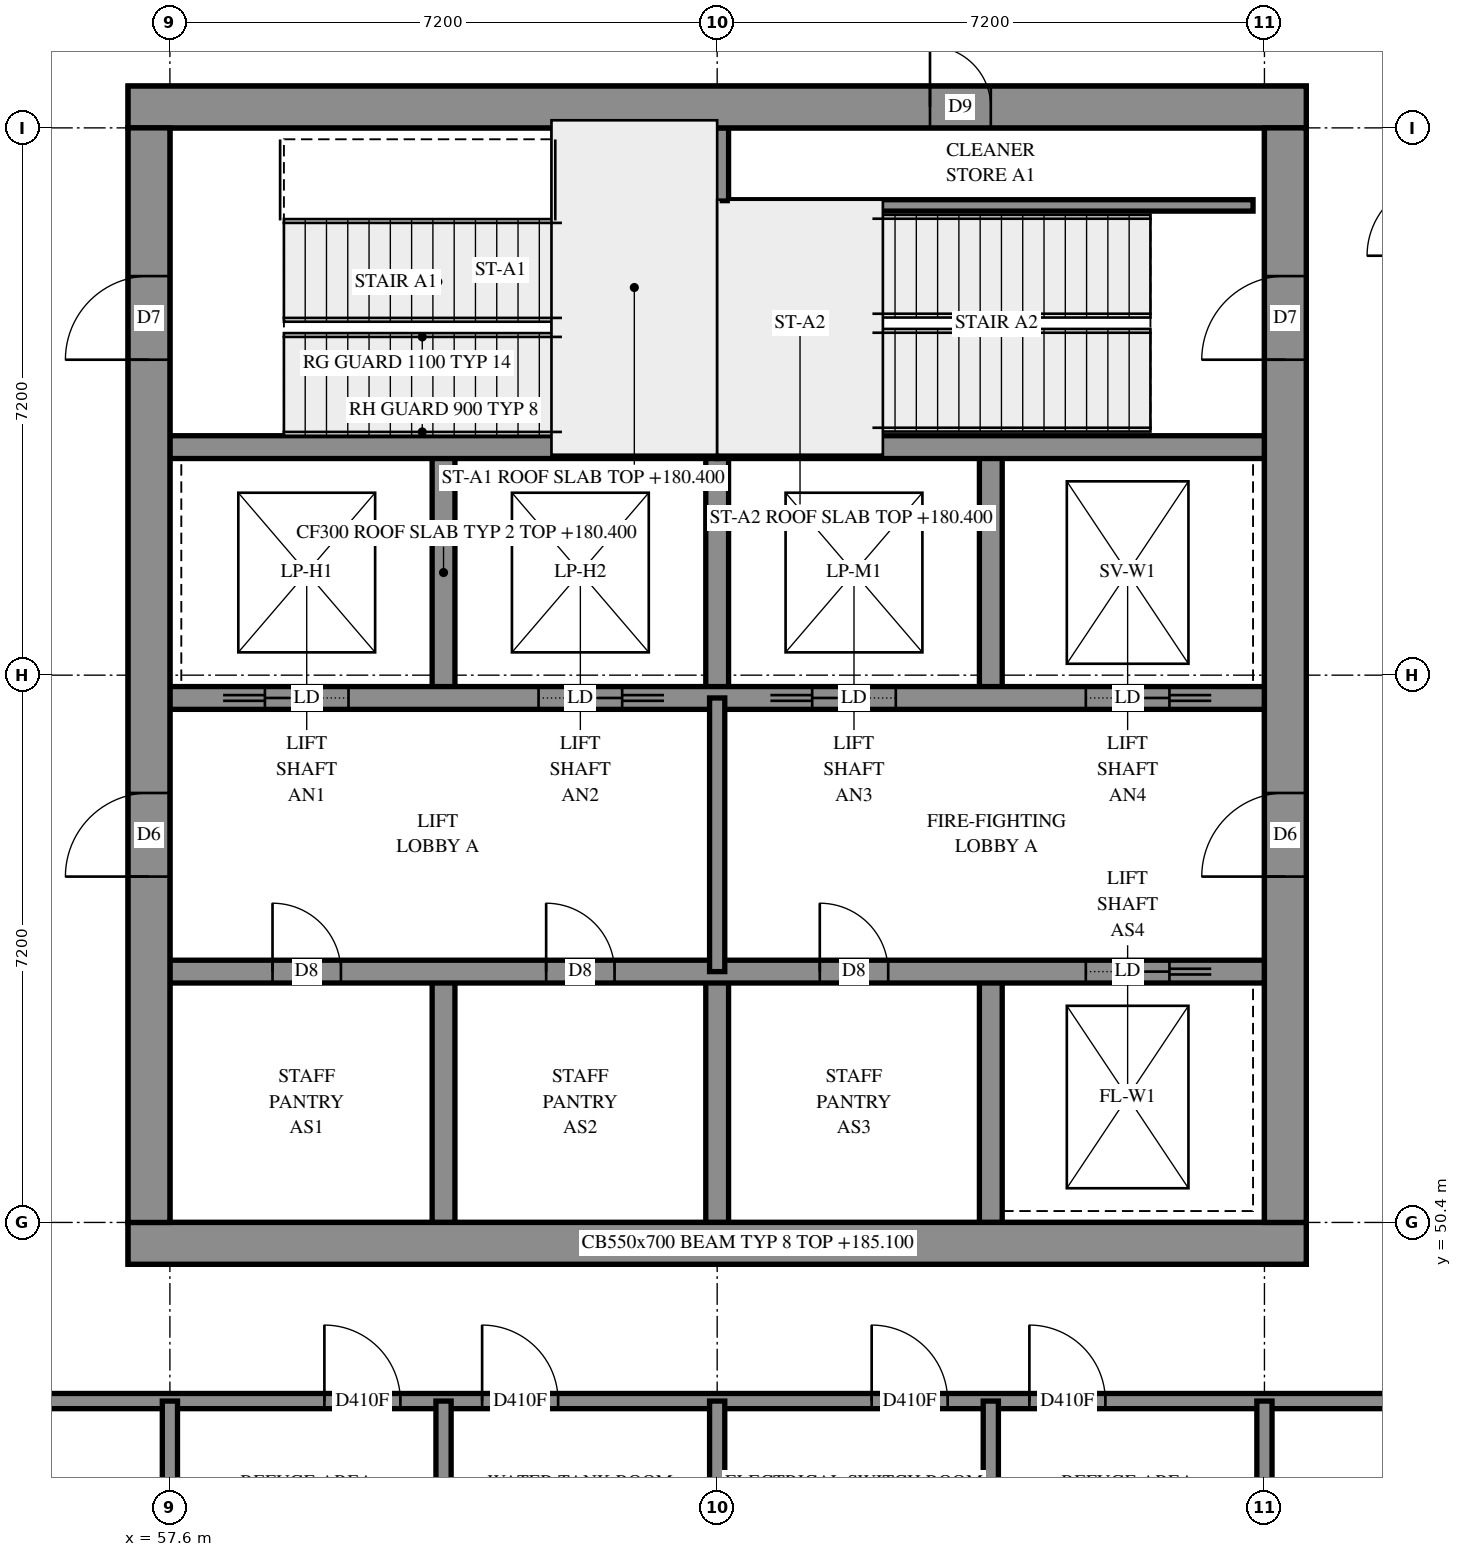
"""IFC4 building model, lengths in metres.
Left out: names, types, materials, properties, quantities, classifications, styles, units other than length and angle.
Written with IfcOpenShell. Run it as: python <this file> out.ifc"""

import sys

from ifc_helpers import new_model, si_unit, direction, frame, frame_2d, origin, place, context, subcontext, project, spatial, rectangle, extrude, element, fill, save


model = new_model("IFC4")
c1 = context("Model", 3, precision=1e-05, world=origin(), true_north=direction((0.0, 1.0)))
c2 = subcontext(c1, "Body", "Model", "MODEL_VIEW")
j1 = project(units=[si_unit("LENGTHUNIT", "METRE"), si_unit("PLANEANGLEUNIT", "RADIAN")], contexts=[c1])
p1 = place(None, origin())
s1 = spatial("IfcSite", under=j1, at=p1, CompositionType="ELEMENT")
p2 = place(p1, origin())
s2 = spatial("IfcBuilding", under=s1, at=p2, CompositionType="ELEMENT")
p3 = place(p2, frame((0.0, 0.0, 180.4)))
s3 = spatial("IfcBuildingStorey", under=s2, at=p3, CompositionType="ELEMENT", Elevation=180.4)
p4 = place(p3, frame((57.05, 50.125, -0.3), z_axis=(0.0, 0.0, 1.0), x_axis=(1.0, 0.0, 0.0)))
e1 = element("IfcWall", 1, at=p4, inside=s3, PredefinedType="SHEAR", context=c2, shape_type="SweptSolid", body=[
    extrude(rectangle(XDim=15.5, YDim=0.55, at=frame_2d((7.75, 0.0))), origin(), (0.0, 0.0, 1.0), 4.3),
])
p5 = place(p3, frame((57.05, 65.075, -0.3), z_axis=(0.0, 0.0, 1.0), x_axis=(1.0, 0.0, 0.0)))
e2 = element("IfcWall", 2, at=p5, inside=s3, PredefinedType="SHEAR", context=c2, shape_type="SweptSolid", body=[
    extrude(rectangle(XDim=15.5, YDim=0.55, at=frame_2d((7.75, 0.0))), origin(), (0.0, 0.0, 1.0), 4.3),
])
p6 = place(p5, frame((10.55, 0.0, 0.3)))
e3 = element("IfcOpeningElement", 3, at=p6, cuts=e2, PredefinedType="OPENING", context=c2, shape_type="SweptSolid", body=[
    extrude(rectangle(XDim=0.8, YDim=2.1, at=frame_2d((0.4, 1.05))), frame((0.0, 0.285, 0.0), z_axis=(0.0, -1.0, 0.0), x_axis=(1.0, 0.0, 0.0)), (0.0, 0.0, 1.0), 0.57),
])
p7 = place(p3, frame((57.325, 50.4, -0.3), z_axis=(0.0, 0.0, 1.0), x_axis=(0.0, 1.0, 0.0)))
e4 = element("IfcWall", 4, at=p7, inside=s3, PredefinedType="SHEAR", context=c2, shape_type="SweptSolid", body=[
    extrude(rectangle(XDim=14.4, YDim=0.55, at=frame_2d((7.2, 0.0))), origin(), (0.0, 0.0, 1.0), 4.3),
])
p8 = place(p7, frame((4.55, 0.0, 0.3)))
e5 = element("IfcOpeningElement", 5, at=p8, cuts=e4, PredefinedType="OPENING", context=c2, shape_type="SweptSolid", body=[
    extrude(rectangle(XDim=1.1, YDim=2.1, at=frame_2d((0.55, 1.05))), frame((0.0, 0.285, 0.0), z_axis=(0.0, -1.0, 0.0), x_axis=(1.0, 0.0, 0.0)), (0.0, 0.0, 1.0), 0.57),
])
p9 = place(p7, frame((11.35, 0.0, 0.3)))
e6 = element("IfcOpeningElement", 6, at=p9, cuts=e4, PredefinedType="OPENING", context=c2, shape_type="SweptSolid", body=[
    extrude(rectangle(XDim=1.1, YDim=2.1, at=frame_2d((0.55, 1.05))), frame((0.0, 0.285, 0.0), z_axis=(0.0, -1.0, 0.0), x_axis=(1.0, 0.0, 0.0)), (0.0, 0.0, 1.0), 0.57),
])
p10 = place(p3, frame((72.275, 50.4, -0.3), z_axis=(0.0, 0.0, 1.0), x_axis=(0.0, 1.0, 0.0)))
e7 = element("IfcWall", 7, at=p10, inside=s3, PredefinedType="SHEAR", context=c2, shape_type="SweptSolid", body=[
    extrude(rectangle(XDim=14.4, YDim=0.55, at=frame_2d((7.2, 0.0))), origin(), (0.0, 0.0, 1.0), 4.3),
])
p11 = place(p10, frame((4.55, 0.0, 0.3)))
e8 = element("IfcOpeningElement", 8, at=p11, cuts=e7, PredefinedType="OPENING", context=c2, shape_type="SweptSolid", body=[
    extrude(rectangle(XDim=1.1, YDim=2.1, at=frame_2d((0.55, 1.05))), frame((0.0, 0.285, 0.0), z_axis=(0.0, -1.0, 0.0), x_axis=(1.0, 0.0, 0.0)), (0.0, 0.0, 1.0), 0.57),
])
p12 = place(p10, frame((11.35, 0.0, 0.3)))
e9 = element("IfcOpeningElement", 9, at=p12, cuts=e7, PredefinedType="OPENING", context=c2, shape_type="SweptSolid", body=[
    extrude(rectangle(XDim=1.1, YDim=2.1, at=frame_2d((0.55, 1.05))), frame((0.0, 0.285, 0.0), z_axis=(0.0, -1.0, 0.0), x_axis=(1.0, 0.0, 0.0)), (0.0, 0.0, 1.0), 0.57),
])
for number, where, z_axis, x_axis in (
    (10, (61.2, 50.4, 0.0), (0.0, 0.0, 1.0), (0.0, 1.0, 0.0)),
    (11, (61.2, 57.3, 0.0), (0.0, 0.0, 1.0), (0.0, 1.0, 0.0)),
    (12, (64.8, 50.4, 0.0), (0.0, 0.0, 1.0), (0.0, 1.0, 0.0)),
    (13, (64.8, 57.3, 0.0), (0.0, 0.0, 1.0), (0.0, 1.0, 0.0)),
    (14, (68.4, 50.4, 0.0), (0.0, 0.0, 1.0), (0.0, 1.0, 0.0)),
    (15, (68.4, 57.3, 0.0), (0.0, 0.0, 1.0), (0.0, 1.0, 0.0)),
):
    element("IfcWall", number, at=place(p3, frame(where, z_axis=z_axis, x_axis=x_axis)), inside=s3, PredefinedType="SOLIDWALL", context=c2, shape_type="SweptSolid", body=[
        extrude(rectangle(XDim=3.3, YDim=0.3, at=frame_2d((1.65, 0.0))), origin(), (0.0, 0.0, 1.0), 4.7),
    ])
p13 = place(p3, frame((57.6, 53.7, 0.0), z_axis=(0.0, 0.0, 1.0), x_axis=(1.0, 0.0, 0.0)))
e16 = element("IfcWall", 16, at=p13, inside=s3, PredefinedType="SOLIDWALL", context=c2, shape_type="SweptSolid", body=[
    extrude(rectangle(XDim=14.4, YDim=0.3, at=frame_2d((7.2, 0.0))), origin(), (0.0, 0.0, 1.0), 4.7),
])
p14 = place(p13, frame((1.35, 0.0, 0.0)))
e17 = element("IfcOpeningElement", 17, at=p14, cuts=e16, PredefinedType="OPENING", context=c2, shape_type="SweptSolid", body=[
    extrude(rectangle(XDim=0.9, YDim=2.1, at=frame_2d((0.45, 1.05))), frame((0.0, 0.16, 0.0), z_axis=(0.0, -1.0, 0.0), x_axis=(1.0, 0.0, 0.0)), (0.0, 0.0, 1.0), 0.32),
])
p15 = place(p13, frame((4.95, 0.0, 0.0)))
e18 = element("IfcOpeningElement", 18, at=p15, cuts=e16, PredefinedType="OPENING", context=c2, shape_type="SweptSolid", body=[
    extrude(rectangle(XDim=0.9, YDim=2.1, at=frame_2d((0.45, 1.05))), frame((0.0, 0.16, 0.0), z_axis=(0.0, -1.0, 0.0), x_axis=(1.0, 0.0, 0.0)), (0.0, 0.0, 1.0), 0.32),
])
p16 = place(p13, frame((8.55, 0.0, 0.0)))
e19 = element("IfcOpeningElement", 19, at=p16, cuts=e16, PredefinedType="OPENING", context=c2, shape_type="SweptSolid", body=[
    extrude(rectangle(XDim=0.9, YDim=2.1, at=frame_2d((0.45, 1.05))), frame((0.0, 0.16, 0.0), z_axis=(0.0, -1.0, 0.0), x_axis=(1.0, 0.0, 0.0)), (0.0, 0.0, 1.0), 0.32),
])
p17 = place(p13, frame((12.05, 0.0, 0.0)))
e20 = element("IfcOpeningElement", 20, at=p17, cuts=e16, PredefinedType="OPENING", context=c2, shape_type="SweptSolid", body=[
    extrude(rectangle(XDim=1.1, YDim=2.1, at=frame_2d((0.55, 1.05))), frame((0.0, 0.16, 0.0), z_axis=(0.0, -1.0, 0.0), x_axis=(1.0, 0.0, 0.0)), (0.0, 0.0, 1.0), 0.32),
])
p18 = place(p3, frame((57.6, 57.3, 0.0), z_axis=(0.0, 0.0, 1.0), x_axis=(1.0, 0.0, 0.0)))
e21 = element("IfcWall", 21, at=p18, inside=s3, PredefinedType="SOLIDWALL", context=c2, shape_type="SweptSolid", body=[
    extrude(rectangle(XDim=14.4, YDim=0.3, at=frame_2d((7.2, 0.0))), origin(), (0.0, 0.0, 1.0), 4.7),
])
p19 = place(p18, frame((1.25, 0.0, 0.0)))
e22 = element("IfcOpeningElement", 22, at=p19, cuts=e21, PredefinedType="OPENING", context=c2, shape_type="SweptSolid", body=[
    extrude(rectangle(XDim=1.1, YDim=2.1, at=frame_2d((0.55, 1.05))), frame((0.0, 0.16, 0.0), z_axis=(0.0, -1.0, 0.0), x_axis=(1.0, 0.0, 0.0)), (0.0, 0.0, 1.0), 0.32),
])
p20 = place(p18, frame((4.85, 0.0, 0.0)))
e23 = element("IfcOpeningElement", 23, at=p20, cuts=e21, PredefinedType="OPENING", context=c2, shape_type="SweptSolid", body=[
    extrude(rectangle(XDim=1.1, YDim=2.1, at=frame_2d((0.55, 1.05))), frame((0.0, 0.16, 0.0), z_axis=(0.0, -1.0, 0.0), x_axis=(1.0, 0.0, 0.0)), (0.0, 0.0, 1.0), 0.32),
])
p21 = place(p18, frame((8.45, 0.0, 0.0)))
e24 = element("IfcOpeningElement", 24, at=p21, cuts=e21, PredefinedType="OPENING", context=c2, shape_type="SweptSolid", body=[
    extrude(rectangle(XDim=1.1, YDim=2.1, at=frame_2d((0.55, 1.05))), frame((0.0, 0.16, 0.0), z_axis=(0.0, -1.0, 0.0), x_axis=(1.0, 0.0, 0.0)), (0.0, 0.0, 1.0), 0.32),
])
p22 = place(p18, frame((12.05, 0.0, 0.0)))
e25 = element("IfcOpeningElement", 25, at=p22, cuts=e21, PredefinedType="OPENING", context=c2, shape_type="SweptSolid", body=[
    extrude(rectangle(XDim=1.1, YDim=2.1, at=frame_2d((0.55, 1.05))), frame((0.0, 0.16, 0.0), z_axis=(0.0, -1.0, 0.0), x_axis=(1.0, 0.0, 0.0)), (0.0, 0.0, 1.0), 0.32),
])
for number, where, z_axis, x_axis in (
    (26, (57.6, 60.6, 0.0), (0.0, 0.0, 1.0), (1.0, 0.0, 0.0)),
    (27, (64.8, 60.6, 0.0), (0.0, 0.0, 1.0), (1.0, 0.0, 0.0)),
):
    element("IfcWall", number, at=place(p3, frame(where, z_axis=z_axis, x_axis=x_axis)), inside=s3, PredefinedType="SOLIDWALL", context=c2, shape_type="SweptSolid", body=[
        extrude(rectangle(XDim=7.2, YDim=0.3, at=frame_2d((3.6, 0.0))), origin(), (0.0, 0.0, 1.0), 4.7),
    ])
p23 = place(p3, frame((64.8, 60.6, 0.0), z_axis=(0.0, 0.0, 1.0), x_axis=(0.0, 1.0, 0.0)))
e28 = element("IfcWall", 28, at=p23, inside=s3, PredefinedType="SOLIDWALL", context=c2, shape_type="SweptSolid", body=[
    extrude(rectangle(XDim=4.2, YDim=0.3, at=frame_2d((2.1, 0.0))), origin(), (0.0, 0.0, 1.0), 4.7),
])
p24 = place(p3, frame((64.95, 63.78, 0.0), z_axis=(0.0, 0.0, 1.0), x_axis=(1.0, 0.0, 0.0)))
e29 = element("IfcWall", 29, at=p24, inside=s3, PredefinedType="PARTITIONING", context=c2, shape_type="SweptSolid", body=[
    extrude(rectangle(XDim=6.9, YDim=0.15, at=frame_2d((3.45, 0.0))), origin(), (0.0, 0.0, 1.0), 4.7),
])
p25 = place(p3, frame((64.8, 53.7, 0.0), z_axis=(0.0, 0.0, 1.0), x_axis=(0.0, 1.0, 0.0)))
e30 = element("IfcWall", 30, at=p25, inside=s3, PredefinedType="PARTITIONING", context=c2, shape_type="SweptSolid", body=[
    extrude(rectangle(XDim=3.6, YDim=0.2, at=frame_2d((1.8, 0.0))), origin(), (0.0, 0.0, 1.0), 4.7),
])
p26 = place(p3, frame((55.25, 48.05, 0.0), z_axis=(0.0, 0.0, 1.0), x_axis=(1.0, 0.0, 0.0)))
e31 = element("IfcWall", 31, at=p26, inside=s3, PredefinedType="PARTITIONING", context=c2, shape_type="SweptSolid", body=[
    extrude(rectangle(XDim=19.12, YDim=0.2, at=frame_2d((9.56, 0.0))), origin(), (0.0, 0.0, 1.0), 4.7),
])
p27 = place(p26, frame((4.383, 0.0, 0.0)))
e32 = element("IfcOpeningElement", 32, at=p27, cuts=e31, PredefinedType="OPENING", context=c2, shape_type="SweptSolid", body=[
    extrude(rectangle(XDim=1.0, YDim=2.1, at=frame_2d((0.5, 1.05))), frame((0.0, 0.11, 0.0), z_axis=(0.0, -1.0, 0.0), x_axis=(1.0, 0.0, 0.0)), (0.0, 0.0, 1.0), 0.22),
])
p28 = place(p26, frame((6.457, 0.0, 0.0)))
e33 = element("IfcOpeningElement", 33, at=p28, cuts=e31, PredefinedType="OPENING", context=c2, shape_type="SweptSolid", body=[
    extrude(rectangle(XDim=1.0, YDim=2.1, at=frame_2d((0.5, 1.05))), frame((0.0, 0.11, 0.0), z_axis=(0.0, -1.0, 0.0), x_axis=(1.0, 0.0, 0.0)), (0.0, 0.0, 1.0), 0.22),
])
p29 = place(p26, frame((11.582, 0.0, 0.0)))
e34 = element("IfcOpeningElement", 34, at=p29, cuts=e31, PredefinedType="OPENING", context=c2, shape_type="SweptSolid", body=[
    extrude(rectangle(XDim=1.0, YDim=2.1, at=frame_2d((0.5, 1.05))), frame((0.0, 0.11, 0.0), z_axis=(0.0, -1.0, 0.0), x_axis=(1.0, 0.0, 0.0)), (0.0, 0.0, 1.0), 0.22),
])
p30 = place(p26, frame((13.658, 0.0, 0.0)))
e35 = element("IfcOpeningElement", 35, at=p30, cuts=e31, PredefinedType="OPENING", context=c2, shape_type="SweptSolid", body=[
    extrude(rectangle(XDim=1.0, YDim=2.1, at=frame_2d((0.5, 1.05))), frame((0.0, 0.11, 0.0), z_axis=(0.0, -1.0, 0.0), x_axis=(1.0, 0.0, 0.0)), (0.0, 0.0, 1.0), 0.22),
])
for number, where, z_axis, x_axis in (
    (36, (57.6, 45.55, 0.0), (0.0, 0.0, 1.0), (0.0, 1.0, 0.0)),
    (37, (61.2, 45.55, 0.0), (0.0, 0.0, 1.0), (0.0, 1.0, 0.0)),
    (38, (64.8, 45.55, 0.0), (0.0, 0.0, 1.0), (0.0, 1.0, 0.0)),
    (39, (68.4, 45.55, 0.0), (0.0, 0.0, 1.0), (0.0, 1.0, 0.0)),
    (40, (72.0, 45.55, 0.0), (0.0, 0.0, 1.0), (0.0, 1.0, 0.0)),
):
    element("IfcWall", number, at=place(p3, frame(where, z_axis=z_axis, x_axis=x_axis)), inside=s3, PredefinedType="PARTITIONING", context=c2, shape_type="SweptSolid", body=[
        extrude(rectangle(XDim=2.5, YDim=0.2, at=frame_2d((1.25, 0.0))), origin(), (0.0, 0.0, 1.0), 4.7),
    ])
p31 = place(p6, origin())
e41 = element("IfcDoor", 41, at=p31, inside=s3, OperationType="SINGLE_SWING_RIGHT", PredefinedType="DOOR", context=c2, shape_type="SweptSolid", body=[
    extrude(rectangle(XDim=0.8, YDim=2.1, at=frame_2d((0.4, 1.05))), frame((0.0, 0.025, 0.0), z_axis=(0.0, -1.0, 0.0), x_axis=(1.0, 0.0, 0.0)), (0.0, 0.0, 1.0), 0.05),
])
fill(e3, e41)
p32 = place(p8, origin())
e42 = element("IfcDoor", 42, at=p32, inside=s3, OperationType="DOUBLE_DOOR_SINGLE_SWING", PredefinedType="DOOR", context=c2, shape_type="SweptSolid", body=[
    extrude(rectangle(XDim=1.1, YDim=2.1, at=frame_2d((0.55, 1.05))), frame((0.0, 0.025, 0.0), z_axis=(0.0, -1.0, 0.0), x_axis=(1.0, 0.0, 0.0)), (0.0, 0.0, 1.0), 0.05),
])
fill(e5, e42)
p33 = place(p11, origin())
e43 = element("IfcDoor", 43, at=p33, inside=s3, OperationType="DOUBLE_DOOR_SINGLE_SWING", PredefinedType="DOOR", context=c2, shape_type="SweptSolid", body=[
    extrude(rectangle(XDim=1.1, YDim=2.1, at=frame_2d((0.55, 1.05))), frame((0.0, 0.025, 0.0), z_axis=(0.0, -1.0, 0.0), x_axis=(1.0, 0.0, 0.0)), (0.0, 0.0, 1.0), 0.05),
])
fill(e8, e43)
p34 = place(p9, origin())
e44 = element("IfcDoor", 44, at=p34, inside=s3, OperationType="SINGLE_SWING_LEFT", PredefinedType="DOOR", context=c2, shape_type="SweptSolid", body=[
    extrude(rectangle(XDim=1.1, YDim=2.1, at=frame_2d((0.55, 1.05))), frame((0.0, 0.025, 0.0), z_axis=(0.0, -1.0, 0.0), x_axis=(1.0, 0.0, 0.0)), (0.0, 0.0, 1.0), 0.05),
])
fill(e6, e44)
p35 = place(p12, origin())
e45 = element("IfcDoor", 45, at=p35, inside=s3, OperationType="SINGLE_SWING_RIGHT", PredefinedType="DOOR", context=c2, shape_type="SweptSolid", body=[
    extrude(rectangle(XDim=1.1, YDim=2.1, at=frame_2d((0.55, 1.05))), frame((0.0, 0.025, 0.0), z_axis=(0.0, -1.0, 0.0), x_axis=(1.0, 0.0, 0.0)), (0.0, 0.0, 1.0), 0.05),
])
fill(e9, e45)
p36 = place(p14, origin())
e46 = element("IfcDoor", 46, at=p36, inside=s3, OperationType="SINGLE_SWING_LEFT", PredefinedType="DOOR", context=c2, shape_type="SweptSolid", body=[
    extrude(rectangle(XDim=0.9, YDim=2.1, at=frame_2d((0.45, 1.05))), frame((0.0, 0.025, 0.0), z_axis=(0.0, -1.0, 0.0), x_axis=(1.0, 0.0, 0.0)), (0.0, 0.0, 1.0), 0.05),
])
fill(e17, e46)
p37 = place(p15, origin())
e47 = element("IfcDoor", 47, at=p37, inside=s3, OperationType="SINGLE_SWING_LEFT", PredefinedType="DOOR", context=c2, shape_type="SweptSolid", body=[
    extrude(rectangle(XDim=0.9, YDim=2.1, at=frame_2d((0.45, 1.05))), frame((0.0, 0.025, 0.0), z_axis=(0.0, -1.0, 0.0), x_axis=(1.0, 0.0, 0.0)), (0.0, 0.0, 1.0), 0.05),
])
fill(e18, e47)
p38 = place(p16, origin())
e48 = element("IfcDoor", 48, at=p38, inside=s3, OperationType="SINGLE_SWING_LEFT", PredefinedType="DOOR", context=c2, shape_type="SweptSolid", body=[
    extrude(rectangle(XDim=0.9, YDim=2.1, at=frame_2d((0.45, 1.05))), frame((0.0, 0.025, 0.0), z_axis=(0.0, -1.0, 0.0), x_axis=(1.0, 0.0, 0.0)), (0.0, 0.0, 1.0), 0.05),
])
fill(e19, e48)
p39 = place(p17, origin())
e49 = element("IfcDoor", 49, at=p39, inside=s3, OperationType="SLIDING_TO_RIGHT", PredefinedType="DOOR", context=c2, shape_type="SweptSolid", body=[
    extrude(rectangle(XDim=1.1, YDim=2.1, at=frame_2d((0.55, 1.05))), frame((0.0, 0.025, 0.0), z_axis=(0.0, -1.0, 0.0), x_axis=(1.0, 0.0, 0.0)), (0.0, 0.0, 1.0), 0.05),
])
fill(e20, e49)
p40 = place(p19, origin())
e50 = element("IfcDoor", 50, at=p40, inside=s3, OperationType="SLIDING_TO_LEFT", PredefinedType="DOOR", context=c2, shape_type="SweptSolid", body=[
    extrude(rectangle(XDim=1.1, YDim=2.1, at=frame_2d((0.55, 1.05))), frame((0.0, 0.025, 0.0), z_axis=(0.0, -1.0, 0.0), x_axis=(1.0, 0.0, 0.0)), (0.0, 0.0, 1.0), 0.05),
])
fill(e22, e50)
p41 = place(p20, origin())
e51 = element("IfcDoor", 51, at=p41, inside=s3, OperationType="SLIDING_TO_RIGHT", PredefinedType="DOOR", context=c2, shape_type="SweptSolid", body=[
    extrude(rectangle(XDim=1.1, YDim=2.1, at=frame_2d((0.55, 1.05))), frame((0.0, 0.025, 0.0), z_axis=(0.0, -1.0, 0.0), x_axis=(1.0, 0.0, 0.0)), (0.0, 0.0, 1.0), 0.05),
])
fill(e23, e51)
p42 = place(p21, origin())
e52 = element("IfcDoor", 52, at=p42, inside=s3, OperationType="SLIDING_TO_LEFT", PredefinedType="DOOR", context=c2, shape_type="SweptSolid", body=[
    extrude(rectangle(XDim=1.1, YDim=2.1, at=frame_2d((0.55, 1.05))), frame((0.0, 0.025, 0.0), z_axis=(0.0, -1.0, 0.0), x_axis=(1.0, 0.0, 0.0)), (0.0, 0.0, 1.0), 0.05),
])
fill(e24, e52)
p43 = place(p22, origin())
e53 = element("IfcDoor", 53, at=p43, inside=s3, OperationType="SLIDING_TO_RIGHT", PredefinedType="DOOR", context=c2, shape_type="SweptSolid", body=[
    extrude(rectangle(XDim=1.1, YDim=2.1, at=frame_2d((0.55, 1.05))), frame((0.0, 0.025, 0.0), z_axis=(0.0, -1.0, 0.0), x_axis=(1.0, 0.0, 0.0)), (0.0, 0.0, 1.0), 0.05),
])
fill(e25, e53)
p44 = place(p27, origin())
e54 = element("IfcDoor", 54, at=p44, inside=s3, OperationType="SINGLE_SWING_LEFT", PredefinedType="DOOR", context=c2, shape_type="SweptSolid", body=[
    extrude(rectangle(XDim=1.0, YDim=2.1, at=frame_2d((0.5, 1.05))), frame((0.0, 0.025, 0.0), z_axis=(0.0, -1.0, 0.0), x_axis=(1.0, 0.0, 0.0)), (0.0, 0.0, 1.0), 0.05),
])
fill(e32, e54)
p45 = place(p28, origin())
e55 = element("IfcDoor", 55, at=p45, inside=s3, OperationType="SINGLE_SWING_RIGHT", PredefinedType="DOOR", context=c2, shape_type="SweptSolid", body=[
    extrude(rectangle(XDim=1.0, YDim=2.1, at=frame_2d((0.5, 1.05))), frame((0.0, 0.025, 0.0), z_axis=(0.0, -1.0, 0.0), x_axis=(1.0, 0.0, 0.0)), (0.0, 0.0, 1.0), 0.05),
])
fill(e33, e55)
p46 = place(p29, origin())
e56 = element("IfcDoor", 56, at=p46, inside=s3, OperationType="SINGLE_SWING_LEFT", PredefinedType="DOOR", context=c2, shape_type="SweptSolid", body=[
    extrude(rectangle(XDim=1.0, YDim=2.1, at=frame_2d((0.5, 1.05))), frame((0.0, 0.025, 0.0), z_axis=(0.0, -1.0, 0.0), x_axis=(1.0, 0.0, 0.0)), (0.0, 0.0, 1.0), 0.05),
])
fill(e34, e56)
p47 = place(p30, origin())
e57 = element("IfcDoor", 57, at=p47, inside=s3, OperationType="SINGLE_SWING_RIGHT", PredefinedType="DOOR", context=c2, shape_type="SweptSolid", body=[
    extrude(rectangle(XDim=1.0, YDim=2.1, at=frame_2d((0.5, 1.05))), frame((0.0, 0.025, 0.0), z_axis=(0.0, -1.0, 0.0), x_axis=(1.0, 0.0, 0.0)), (0.0, 0.0, 1.0), 0.05),
])
fill(e35, e57)
save(model, sys.argv[1])
